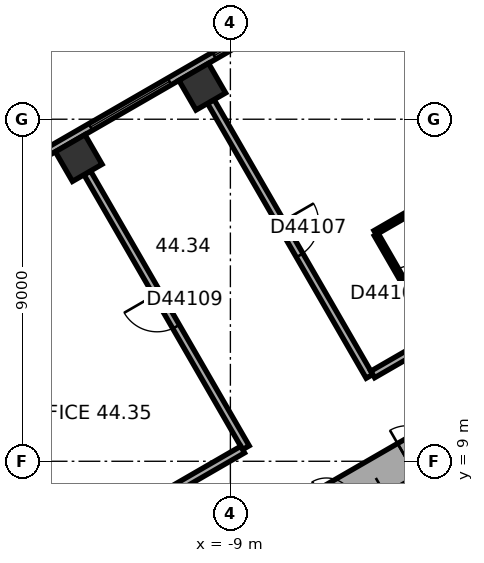
"""IFC4 building model, lengths in metres.
Left out: names, types, materials, properties, quantities, classifications, styles, units other than length and angle.
Written with IfcOpenShell. Run it as: python <this file> out.ifc"""

import sys

from ifc_helpers import new_model, si_unit, direction, frame, frame_2d, origin, origin_2d, place, context, subcontext, project, spatial, rectangle, extrude, element, fill, save


model = new_model("IFC4")
c1 = context("Model", 3, precision=1e-05, world=origin(), true_north=direction((0.0, 1.0)))
c2 = subcontext(c1, "Body", "Model", "MODEL_VIEW")
j1 = project(units=[si_unit("LENGTHUNIT", "METRE"), si_unit("PLANEANGLEUNIT", "RADIAN")], contexts=[c1])
p1 = place(None, origin())
s1 = spatial("IfcSite", under=j1, at=p1, CompositionType="ELEMENT")
p2 = place(p1, origin())
s2 = spatial("IfcBuilding", under=s1, at=p2, CompositionType="ELEMENT")
p3 = place(p2, frame((0.0, 0.0, 179.9)))
s3 = spatial("IfcBuildingStorey", under=s2, at=p3, CompositionType="ELEMENT", Elevation=179.9)
for number, where, z_axis, x_axis in (
    (1, (-9.74, 18.856, 0.0), (0.0, 0.0, 1.0), (-0.866, -0.5, 0.0)),
    (2, (-12.991, 16.979, 0.0), (0.0, 0.0, 1.0), (-0.866, -0.5, 0.0)),
):
    element("IfcColumn", number, at=place(p3, frame(where, z_axis=z_axis, x_axis=x_axis)), inside=s3, PredefinedType="COLUMN", context=c2, shape_type="SweptSolid", body=[
        extrude(rectangle(XDim=0.9, YDim=0.9, at=origin_2d()), origin(), (0.0, 0.0, 1.0), 3.7),
    ])
p4 = place(p3, frame((0.25, 11.691, 0.0), z_axis=(0.0, 0.0, 1.0), x_axis=(-0.866022616891, -0.50000482701, 0.0)))
e3 = element("IfcWall", 3, at=p4, inside=s3, PredefinedType="SHEAR", context=c2, shape_type="SweptSolid", body=[
    extrude(rectangle(XDim=12.125, YDim=1.0, at=frame_2d((6.062, 0.0))), origin(), (0.0, 0.0, 1.0), 3.7),
])
p5 = place(p4, frame((6.262, 0.0, 0.0)))
e4 = element("IfcOpeningElement", 4, at=p5, cuts=e3, PredefinedType="OPENING", context=c2, shape_type="SweptSolid", body=[
    extrude(rectangle(XDim=1.5, YDim=2.1, at=frame_2d((0.75, 1.05))), frame((0.0, 0.51, 0.0), z_axis=(0.0, -1.0, 0.0), x_axis=(1.0, 0.0, 0.0)), (0.0, 0.0, 1.0), 1.02),
])
p6 = place(p4, frame((1.812, 0.0, 0.0)))
e5 = element("IfcOpeningElement", 5, at=p6, cuts=e3, PredefinedType="OPENING", context=c2, shape_type="SweptSolid", body=[
    extrude(rectangle(XDim=0.9, YDim=2.1, at=frame_2d((0.45, 1.05))), frame((0.0, 0.51, 0.0), z_axis=(0.0, -1.0, 0.0), x_axis=(1.0, 0.0, 0.0)), (0.0, 0.0, 1.0), 1.02),
])
p7 = place(p4, frame((4.412, 0.0, 0.0)))
e6 = element("IfcOpeningElement", 6, at=p7, cuts=e3, PredefinedType="OPENING", context=c2, shape_type="SweptSolid", body=[
    extrude(rectangle(XDim=0.9, YDim=2.1, at=frame_2d((0.45, 1.05))), frame((0.0, 0.51, 0.0), z_axis=(0.0, -1.0, 0.0), x_axis=(1.0, 0.0, 0.0)), (0.0, 0.0, 1.0), 1.02),
])
p8 = place(p3, frame((-2.961, 23.405, 0.0), z_axis=(0.0, 0.0, 1.0), x_axis=(-0.866023315909, -0.500003616288, 0.0)))
e7 = element("IfcWall", 7, at=p8, inside=s3, PredefinedType="STANDARD", context=c2, shape_type="SweptSolid", body=[
    extrude(rectangle(XDim=20.044, YDim=0.2, at=frame_2d((10.022, 0.0))), origin(), (0.0, 0.0, 1.0), 3.7),
])
p9 = place(p8, frame((1.314, 0.0, 0.9)))
e8 = element("IfcOpeningElement", 8, at=p9, cuts=e7, PredefinedType="OPENING", context=c2, shape_type="SweptSolid", body=[
    extrude(rectangle(XDim=2.4, YDim=2.0, at=frame_2d((1.2, 1.0))), frame((0.0, 0.11, 0.0), z_axis=(0.0, -1.0, 0.0), x_axis=(1.0, 0.0, 0.0)), (0.0, 0.0, 1.0), 0.22),
])
p10 = place(p8, frame((5.069, 0.0, 0.9)))
e9 = element("IfcOpeningElement", 9, at=p10, cuts=e7, PredefinedType="OPENING", context=c2, shape_type="SweptSolid", body=[
    extrude(rectangle(XDim=2.4, YDim=2.0, at=frame_2d((1.2, 1.0))), frame((0.0, 0.11, 0.0), z_axis=(0.0, -1.0, 0.0), x_axis=(1.0, 0.0, 0.0)), (0.0, 0.0, 1.0), 0.22),
])
p11 = place(p8, frame((8.823, 0.0, 0.9)))
e10 = element("IfcOpeningElement", 10, at=p11, cuts=e7, PredefinedType="OPENING", context=c2, shape_type="SweptSolid", body=[
    extrude(rectangle(XDim=2.4, YDim=2.0, at=frame_2d((1.2, 1.0))), frame((0.0, 0.11, 0.0), z_axis=(0.0, -1.0, 0.0), x_axis=(1.0, 0.0, 0.0)), (0.0, 0.0, 1.0), 0.22),
])
p12 = place(p8, frame((12.577, 0.0, 0.9)))
e11 = element("IfcOpeningElement", 11, at=p12, cuts=e7, PredefinedType="OPENING", context=c2, shape_type="SweptSolid", body=[
    extrude(rectangle(XDim=2.4, YDim=2.0, at=frame_2d((1.2, 1.0))), frame((0.0, 0.11, 0.0), z_axis=(0.0, -1.0, 0.0), x_axis=(1.0, 0.0, 0.0)), (0.0, 0.0, 1.0), 0.22),
])
p13 = place(p8, frame((16.331, 0.0, 0.9)))
e12 = element("IfcOpeningElement", 12, at=p13, cuts=e7, PredefinedType="OPENING", context=c2, shape_type="SweptSolid", body=[
    extrude(rectangle(XDim=2.4, YDim=2.0, at=frame_2d((1.2, 1.0))), frame((0.0, 0.11, 0.0), z_axis=(0.0, -1.0, 0.0), x_axis=(1.0, 0.0, 0.0)), (0.0, 0.0, 1.0), 0.22),
])
p14 = place(p3, frame((-12.766, 16.589, 0.0), z_axis=(0.0, 0.0, 1.0), x_axis=(0.500010139422, -0.866019549707, 0.0)))
e13 = element("IfcWall", 13, at=p14, inside=s3, PredefinedType="PARTITIONING", context=c2, shape_type="SweptSolid", body=[
    extrude(rectangle(XDim=8.35, YDim=0.2, at=frame_2d((4.175, 0.0))), origin(), (0.0, 0.0, 1.0), 3.42),
])
p15 = place(p14, frame((3.675, 0.0, 0.0)))
e14 = element("IfcOpeningElement", 14, at=p15, cuts=e13, PredefinedType="OPENING", context=c2, shape_type="SweptSolid", body=[
    extrude(rectangle(XDim=1.0, YDim=2.1, at=frame_2d((0.5, 1.05))), frame((0.0, 0.11, 0.0), z_axis=(0.0, -1.0, 0.0), x_axis=(1.0, 0.0, 0.0)), (0.0, 0.0, 1.0), 0.22),
])
p16 = place(p3, frame((-9.515, 18.466, 0.0), z_axis=(0.0, 0.0, 1.0), x_axis=(0.500010139422, -0.866019549707, 0.0)))
e15 = element("IfcWall", 15, at=p16, inside=s3, PredefinedType="PARTITIONING", context=c2, shape_type="SweptSolid", body=[
    extrude(rectangle(XDim=8.35, YDim=0.2, at=frame_2d((4.175, 0.0))), origin(), (0.0, 0.0, 1.0), 2.87),
])
p17 = place(p16, frame((3.675, 0.0, 0.0)))
e16 = element("IfcOpeningElement", 16, at=p17, cuts=e15, PredefinedType="OPENING", context=c2, shape_type="SweptSolid", body=[
    extrude(rectangle(XDim=1.0, YDim=2.1, at=frame_2d((0.5, 1.05))), frame((0.0, 0.11, 0.0), z_axis=(0.0, -1.0, 0.0), x_axis=(1.0, 0.0, 0.0)), (0.0, 0.0, 1.0), 0.22),
])
p18 = place(p3, frame((-8.678, 9.308, 0.0), z_axis=(0.0, 0.0, 1.0), x_axis=(-0.866000359435, -0.500043375578, 0.0)))
e17 = element("IfcWall", 17, at=p18, inside=s3, PredefinedType="PARTITIONING", context=c2, shape_type="SweptSolid", body=[
    extrude(rectangle(XDim=3.161, YDim=0.2, at=frame_2d((1.581, 0.0))), origin(), (0.0, 0.0, 1.0), 3.42),
])
p19 = place(p3, frame((-5.191, 15.016, 0.0), z_axis=(0.0, 0.0, 1.0), x_axis=(0.866034573852, 0.49998411664, 0.0)))
e18 = element("IfcWall", 18, at=p19, inside=s3, PredefinedType="PARTITIONING", context=c2, shape_type="SweptSolid", body=[
    extrude(rectangle(XDim=2.8, YDim=0.12, at=frame_2d((1.4, 0.0))), origin(), (0.0, 0.0, 1.0), 3.42),
])
p20 = place(p3, frame((-3.641, 12.331, 0.0), z_axis=(0.0, 0.0, 1.0), x_axis=(-0.499991248344, 0.866030456496, 0.0)))
e19 = element("IfcWall", 19, at=p20, inside=s3, PredefinedType="PARTITIONING", context=c2, shape_type="SweptSolid", body=[
    extrude(rectangle(XDim=3.04, YDim=0.12, at=frame_2d((1.52, 0.0))), origin(), (0.0, 0.0, 1.0), 3.42),
])
p21 = place(p20, frame((1.07, 0.0, 0.0)))
e20 = element("IfcOpeningElement", 20, at=p21, cuts=e19, PredefinedType="OPENING", context=c2, shape_type="SweptSolid", body=[
    extrude(rectangle(XDim=0.9, YDim=2.1, at=frame_2d((0.45, 1.05))), frame((0.0, 0.07, 0.0), z_axis=(0.0, -1.0, 0.0), x_axis=(1.0, 0.0, 0.0)), (0.0, 0.0, 1.0), 0.14),
])
p22 = place(p3, frame((-1.167, 13.645, 0.0), z_axis=(0.0, 0.0, 1.0), x_axis=(-0.866034830959, -0.499983671299, 0.0)))
e21 = element("IfcWall", 21, at=p22, inside=s3, PredefinedType="PARTITIONING", context=c2, shape_type="SweptSolid", body=[
    extrude(rectangle(XDim=4.719, YDim=0.2, at=frame_2d((2.36, 0.0))), origin(), (0.0, 0.0, 1.0), 3.42),
])
p23 = place(p10, origin())
e22 = element("IfcWindow", 22, at=p23, inside=s3, PartitioningType="SINGLE_PANEL", PredefinedType="WINDOW", context=c2, shape_type="SweptSolid", body=[
    extrude(rectangle(XDim=2.4, YDim=2.0, at=frame_2d((1.2, 1.0))), frame((0.0, 0.03, 0.0), z_axis=(0.0, -1.0, 0.0), x_axis=(1.0, 0.0, 0.0)), (0.0, 0.0, 1.0), 0.06),
])
fill(e9, e22)
p24 = place(p11, origin())
e23 = element("IfcWindow", 23, at=p24, inside=s3, PartitioningType="SINGLE_PANEL", PredefinedType="WINDOW", context=c2, shape_type="SweptSolid", body=[
    extrude(rectangle(XDim=2.4, YDim=2.0, at=frame_2d((1.2, 1.0))), frame((0.0, 0.03, 0.0), z_axis=(0.0, -1.0, 0.0), x_axis=(1.0, 0.0, 0.0)), (0.0, 0.0, 1.0), 0.06),
])
fill(e10, e23)
p25 = place(p5, origin())
e24 = element("IfcDoor", 24, at=p25, inside=s3, OperationType="DOUBLE_DOOR_SINGLE_SWING", PredefinedType="DOOR", context=c2, shape_type="SweptSolid", body=[
    extrude(rectangle(XDim=1.5, YDim=2.1, at=frame_2d((0.75, 1.05))), frame((0.0, 0.025, 0.0), z_axis=(0.0, -1.0, 0.0), x_axis=(1.0, 0.0, 0.0)), (0.0, 0.0, 1.0), 0.05),
])
fill(e4, e24)
p26 = place(p17, origin())
e25 = element("IfcDoor", 25, at=p26, inside=s3, OperationType="SINGLE_SWING_LEFT", PredefinedType="DOOR", context=c2, shape_type="SweptSolid", body=[
    extrude(rectangle(XDim=1.0, YDim=2.1, at=frame_2d((0.5, 1.05))), frame((0.0, 0.025, 0.0), z_axis=(0.0, -1.0, 0.0), x_axis=(1.0, 0.0, 0.0)), (0.0, 0.0, 1.0), 0.05),
])
fill(e16, e25)
p27 = place(p21, origin())
e26 = element("IfcDoor", 26, at=p27, inside=s3, OperationType="SINGLE_SWING_LEFT", PredefinedType="DOOR", context=c2, shape_type="SweptSolid", body=[
    extrude(rectangle(XDim=0.9, YDim=2.1, at=frame_2d((0.45, 1.05))), frame((0.0, 0.025, 0.0), z_axis=(0.0, -1.0, 0.0), x_axis=(1.0, 0.0, 0.0)), (0.0, 0.0, 1.0), 0.05),
])
fill(e20, e26)
p28 = place(p15, origin())
e27 = element("IfcDoor", 27, at=p28, inside=s3, OperationType="SINGLE_SWING_LEFT", PredefinedType="DOOR", context=c2, shape_type="SweptSolid", body=[
    extrude(rectangle(XDim=1.0, YDim=2.1, at=frame_2d((0.5, 1.05))), frame((0.0, 0.025, 0.0), z_axis=(0.0, -1.0, 0.0), x_axis=(1.0, 0.0, 0.0)), (0.0, 0.0, 1.0), 0.05),
])
fill(e14, e27)
save(model, sys.argv[1])
